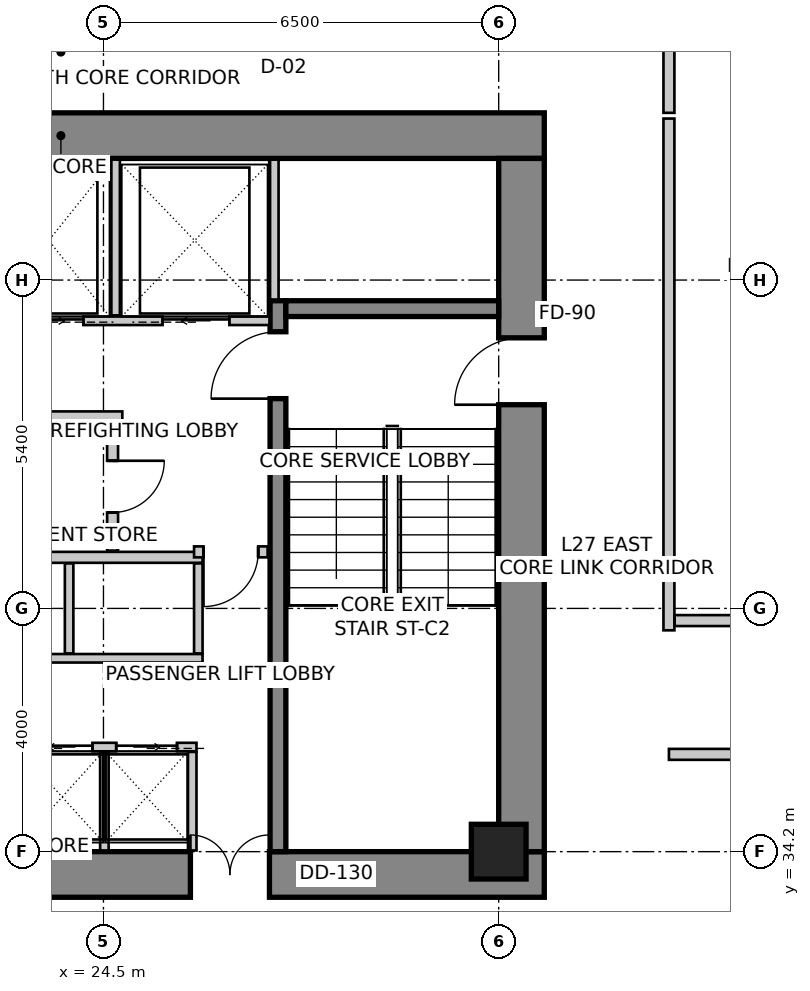
"""IFC4 building model, lengths in metres.
Left out: names, types, materials, properties, quantities, classifications, styles, units other than length and angle.
Written with IfcOpenShell. Run it as: python <this file> out.ifc"""

import sys

from ifc_helpers import new_model, si_unit, direction, frame, frame_2d, origin, origin_2d, place, context, subcontext, project, spatial, rectangle, extrude, source, transform, mapped, element, fill, save


model = new_model("IFC4")
c1 = context("Model", 3, precision=1e-05, world=origin(), true_north=direction((0.0, 1.0)))
c2 = subcontext(c1, "Body", "Model", "MODEL_VIEW")
j1 = project(units=[si_unit("LENGTHUNIT", "METRE"), si_unit("PLANEANGLEUNIT", "RADIAN")], contexts=[c1])
p1 = place(None, origin())
s1 = spatial("IfcSite", under=j1, at=p1, CompositionType="ELEMENT")
p2 = place(p1, origin())
s2 = spatial("IfcBuilding", under=s1, at=p2, CompositionType="ELEMENT")
p3 = place(p2, frame((0.0, 0.0, 114.2)))
s3 = spatial("IfcBuildingStorey", under=s2, at=p3, CompositionType="ELEMENT", Elevation=114.2)
p4 = place(p3, frame((15.85, 45.975, 0.0), z_axis=(0.0, 0.0, 1.0), x_axis=(1.0, 0.0, 0.0)))
e1 = element("IfcWall", 1, at=p4, inside=s3, PredefinedType="SHEAR", context=c2, shape_type="SweptSolid", body=[
    extrude(rectangle(XDim=15.9, YDim=0.75, at=frame_2d((7.95, 0.0))), origin(), (0.0, 0.0, 1.0), 3.6),
])
p5 = place(p3, frame((15.85, 33.825, 0.0), z_axis=(0.0, 0.0, 1.0), x_axis=(1.0, 0.0, 0.0)))
e2 = element("IfcWall", 2, at=p5, inside=s3, PredefinedType="SHEAR", context=c2, shape_type="SweptSolid", body=[
    extrude(rectangle(XDim=15.9, YDim=0.75, at=frame_2d((7.95, 0.0))), origin(), (0.0, 0.0, 1.0), 3.6),
])
m1 = source(origin(), c2, "Body", "SweptSolid", [
    extrude(rectangle(XDim=1.3, YDim=2.15, at=frame_2d((0.65, 1.075))), frame((0.0, 0.385, 0.0), z_axis=(0.0, -1.0, 0.0), x_axis=(1.0, 0.0, 0.0)), (0.0, 0.0, 1.0), 0.77),
])
p6 = place(p5, frame((10.08, 0.0, 0.0)))
e3 = element("IfcOpeningElement", 3, at=p6, cuts=e2, PredefinedType="OPENING", context=c2, shape_type="MappedRepresentation", body=[
    mapped(m1, transform((0.0, 0.0, 0.0), scale=1.0)),
])
p7 = place(p3, frame((31.375, 34.2, 0.0), z_axis=(0.0, 0.0, 1.0), x_axis=(0.0, 1.0, 0.0)))
e4 = element("IfcWall", 4, at=p7, inside=s3, PredefinedType="SHEAR", context=c2, shape_type="SweptSolid", body=[
    extrude(rectangle(XDim=11.4, YDim=0.75, at=frame_2d((5.7, 0.0))), origin(), (0.0, 0.0, 1.0), 3.6),
])
m2 = source(origin(), c2, "Body", "SweptSolid", [
    extrude(rectangle(XDim=1.1, YDim=2.15, at=frame_2d((0.55, 1.075))), frame((0.0, 0.385, 0.0), z_axis=(0.0, -1.0, 0.0), x_axis=(1.0, 0.0, 0.0)), (0.0, 0.0, 1.0), 0.77),
])
p8 = place(p7, frame((7.35, 0.0, 0.0)))
e5 = element("IfcOpeningElement", 5, at=p8, cuts=e4, PredefinedType="OPENING", context=c2, shape_type="MappedRepresentation", body=[
    mapped(m2, transform((0.0, 0.0, 0.0), scale=1.0)),
])
p9 = place(p3, frame((27.37, 34.2, 0.0), z_axis=(0.0, 0.0, 1.0), x_axis=(0.0, 1.0, 0.0)))
e6 = element("IfcWall", 6, at=p9, inside=s3, PredefinedType="SHEAR", context=c2, shape_type="SweptSolid", body=[
    extrude(rectangle(XDim=9.06, YDim=0.26, at=frame_2d((4.53, 0.0))), origin(), (0.0, 0.0, 1.0), 3.6),
])
m3 = source(origin(), c2, "Body", "SweptSolid", [
    extrude(rectangle(XDim=1.1, YDim=2.15, at=frame_2d((0.55, 1.075))), frame((0.0, 0.14, 0.0), z_axis=(0.0, -1.0, 0.0), x_axis=(1.0, 0.0, 0.0)), (0.0, 0.0, 1.0), 0.28),
])
p10 = place(p9, frame((7.45, 0.0, 0.0)))
e7 = element("IfcOpeningElement", 7, at=p10, cuts=e6, PredefinedType="OPENING", context=c2, shape_type="MappedRepresentation", body=[
    mapped(m3, transform((0.0, 0.0, 0.0), scale=1.0)),
])
p11 = place(p3, frame((27.5, 43.13, 0.0), z_axis=(0.0, 0.0, 1.0), x_axis=(1.0, 0.0, 0.0)))
e8 = element("IfcWall", 8, at=p11, inside=s3, PredefinedType="SHEAR", context=c2, shape_type="SweptSolid", body=[
    extrude(rectangle(XDim=3.5, YDim=0.26, at=frame_2d((1.75, 0.0))), origin(), (0.0, 0.0, 1.0), 3.6),
])
m4 = source(origin(), c2, "Body", "SweptSolid", [
    extrude(rectangle(XDim=0.9, YDim=0.9, at=origin_2d()), origin(), (0.0, 0.0, 1.0), 3.6),
])
p12 = place(p3, frame((31.0, 34.2, 0.0), z_axis=(0.0, 0.0, 1.0), x_axis=(1.0, 0.0, 0.0)))
e9 = element("IfcColumn", 9, at=p12, inside=s3, PredefinedType="COLUMN", context=c2, shape_type="MappedRepresentation", body=[
    mapped(m4, transform((0.0, 0.0, 0.0), scale=1.0)),
])
p13 = place(p3, frame((53.561, 47.48, 0.0), z_axis=(0.0, 0.0, 1.0), x_axis=(-0.985845173895, 0.167658262868, 0.0)))
e10 = element("IfcWall", 10, at=p13, inside=s3, PredefinedType="SOLIDWALL", context=c2, shape_type="SweptSolid", body=[
    extrude(rectangle(XDim=32.132, YDim=0.3, at=frame_2d((16.066, 0.0))), origin(), (0.0, 0.0, 1.0), 3.35),
])
m5 = source(origin(), c2, "Body", "SweptSolid", [
    extrude(rectangle(XDim=2.1, YDim=2.0, at=frame_2d((1.05, 1.0))), frame((0.0, 0.16, 0.0), z_axis=(0.0, -1.0, 0.0), x_axis=(1.0, 0.0, 0.0)), (0.0, 0.0, 1.0), 0.32),
])
p14 = place(p13, frame((1.032, 0.0, 0.85)))
e11 = element("IfcOpeningElement", 11, at=p14, cuts=e10, PredefinedType="OPENING", context=c2, shape_type="MappedRepresentation", body=[
    mapped(m5, transform((0.0, 0.0, 0.0), scale=1.0)),
])
p15 = place(p13, frame((4.504, 0.0, 0.85)))
e12 = element("IfcOpeningElement", 12, at=p15, cuts=e10, PredefinedType="OPENING", context=c2, shape_type="MappedRepresentation", body=[
    mapped(m5, transform((0.0, 0.0, 0.0), scale=1.0)),
])
m6 = source(origin(), c2, "Body", "SweptSolid", [
    extrude(rectangle(XDim=1.5, YDim=1.8, at=frame_2d((0.75, 0.9))), frame((0.0, 0.16, 0.0), z_axis=(0.0, -1.0, 0.0), x_axis=(1.0, 0.0, 0.0)), (0.0, 0.0, 1.0), 0.32),
])
p16 = place(p13, frame((7.464, 0.0, 0.85)))
e13 = element("IfcOpeningElement", 13, at=p16, cuts=e10, PredefinedType="OPENING", context=c2, shape_type="MappedRepresentation", body=[
    mapped(m6, transform((0.0, 0.0, 0.0), scale=1.0)),
])
p17 = place(p13, frame((9.824, 0.0, 0.85)))
e14 = element("IfcOpeningElement", 14, at=p17, cuts=e10, PredefinedType="OPENING", context=c2, shape_type="MappedRepresentation", body=[
    mapped(m5, transform((0.0, 0.0, 0.0), scale=1.0)),
])
p18 = place(p13, frame((12.784, 0.0, 0.85)))
e15 = element("IfcOpeningElement", 15, at=p18, cuts=e10, PredefinedType="OPENING", context=c2, shape_type="MappedRepresentation", body=[
    mapped(m6, transform((0.0, 0.0, 0.0), scale=1.0)),
])
p19 = place(p13, frame((15.144, 0.0, 0.85)))
e16 = element("IfcOpeningElement", 16, at=p19, cuts=e10, PredefinedType="OPENING", context=c2, shape_type="MappedRepresentation", body=[
    mapped(m5, transform((0.0, 0.0, 0.0), scale=1.0)),
])
p20 = place(p13, frame((18.086, 0.0, 0.85)))
e17 = element("IfcOpeningElement", 17, at=p20, cuts=e10, PredefinedType="OPENING", context=c2, shape_type="MappedRepresentation", body=[
    mapped(m6, transform((0.0, 0.0, 0.0), scale=1.0)),
])
p21 = place(p13, frame((20.459, 0.0, 0.85)))
e18 = element("IfcOpeningElement", 18, at=p21, cuts=e10, PredefinedType="OPENING", context=c2, shape_type="MappedRepresentation", body=[
    mapped(m5, transform((0.0, 0.0, 0.0), scale=1.0)),
])
p22 = place(p13, frame((25.55, 0.0, 0.85)))
e19 = element("IfcOpeningElement", 19, at=p22, cuts=e10, PredefinedType="OPENING", context=c2, shape_type="MappedRepresentation", body=[
    mapped(m5, transform((0.0, 0.0, 0.0), scale=1.0)),
])
m7 = source(origin(), c2, "Body", "SweptSolid", [
    extrude(rectangle(XDim=0.9, YDim=1.6, at=frame_2d((0.45, 0.8))), frame((0.0, 0.16, 0.0), z_axis=(0.0, -1.0, 0.0), x_axis=(1.0, 0.0, 0.0)), (0.0, 0.0, 1.0), 0.32),
])
p23 = place(p13, frame((30.65, 0.0, 0.85)))
e20 = element("IfcOpeningElement", 20, at=p23, cuts=e10, PredefinedType="OPENING", context=c2, shape_type="MappedRepresentation", body=[
    mapped(m7, transform((0.0, 0.0, 0.0), scale=1.0)),
])
p24 = place(p3, frame((20.37, 42.93, 0.0), z_axis=(0.0, 0.0, 1.0), x_axis=(1.0, 0.0, 0.0)))
e21 = element("IfcWall", 21, at=p24, inside=s3, PredefinedType="SOLIDWALL", context=c2, shape_type="SweptSolid", body=[
    extrude(rectangle(XDim=6.86, YDim=0.14, at=frame_2d((3.43, 0.0))), origin(), (0.0, 0.0, 1.0), 3.35),
])
m8 = source(origin(), c2, "Body", "SweptSolid", [
    extrude(rectangle(XDim=1.1, YDim=2.15, at=frame_2d((0.55, 1.075))), frame((0.0, 0.08, 0.0), z_axis=(0.0, -1.0, 0.0), x_axis=(1.0, 0.0, 0.0)), (0.0, 0.0, 1.0), 0.16),
])
p25 = place(p24, frame((0.5, 0.0, 0.0)))
e22 = element("IfcOpeningElement", 22, at=p25, cuts=e21, PredefinedType="OPENING", context=c2, shape_type="MappedRepresentation", body=[
    mapped(m8, transform((0.0, 0.0, 0.0), scale=1.0)),
])
p26 = place(p24, frame((2.7, 0.0, 0.0)))
e23 = element("IfcOpeningElement", 23, at=p26, cuts=e21, PredefinedType="OPENING", context=c2, shape_type="MappedRepresentation", body=[
    mapped(m8, transform((0.0, 0.0, 0.0), scale=1.0)),
])
p27 = place(p24, frame((5.1, 0.0, 0.0)))
e24 = element("IfcOpeningElement", 24, at=p27, cuts=e21, PredefinedType="OPENING", context=c2, shape_type="MappedRepresentation", body=[
    mapped(m8, transform((0.0, 0.0, 0.0), scale=1.0)),
])
p28 = place(p3, frame((27.31, 43.28, 0.0), z_axis=(0.0, 0.0, 1.0), x_axis=(0.0, 1.0, 0.0)))
e25 = element("IfcWall", 25, at=p28, inside=s3, PredefinedType="SOLIDWALL", context=c2, shape_type="SweptSolid", body=[
    extrude(rectangle(XDim=2.3, YDim=0.14, at=frame_2d((1.15, 0.0))), origin(), (0.0, 0.0, 1.0), 3.35),
])
p29 = place(p3, frame((24.7, 43.02, 0.0), z_axis=(0.0, 0.0, 1.0), x_axis=(0.0, 1.0, 0.0)))
e26 = element("IfcWall", 26, at=p29, inside=s3, PredefinedType="SOLIDWALL", context=c2, shape_type="SweptSolid", body=[
    extrude(rectangle(XDim=2.56, YDim=0.14, at=frame_2d((1.28, 0.0))), origin(), (0.0, 0.0, 1.0), 3.35),
])
p30 = place(p3, frame((23.0, 35.92, 0.0), z_axis=(0.0, 0.0, 1.0), x_axis=(1.0, 0.0, 0.0)))
e27 = element("IfcWall", 27, at=p30, inside=s3, PredefinedType="SOLIDWALL", context=c2, shape_type="SweptSolid", body=[
    extrude(rectangle(XDim=3.03, YDim=0.14, at=frame_2d((1.515, 0.0))), origin(), (0.0, 0.0, 1.0), 3.35),
])
m9 = source(origin(), c2, "Body", "SweptSolid", [
    extrude(rectangle(XDim=1.0, YDim=2.15, at=frame_2d((0.5, 1.075))), frame((0.0, 0.08, 0.0), z_axis=(0.0, -1.0, 0.0), x_axis=(1.0, 0.0, 0.0)), (0.0, 0.0, 1.0), 0.16),
])
p31 = place(p30, frame((0.32, 0.0, 0.0)))
e28 = element("IfcOpeningElement", 28, at=p31, cuts=e27, PredefinedType="OPENING", context=c2, shape_type="MappedRepresentation", body=[
    mapped(m9, transform((0.0, 0.0, 0.0), scale=1.0)),
])
p32 = place(p30, frame((1.71, 0.0, 0.0)))
e29 = element("IfcOpeningElement", 29, at=p32, cuts=e27, PredefinedType="OPENING", context=c2, shape_type="MappedRepresentation", body=[
    mapped(m9, transform((0.0, 0.0, 0.0), scale=1.0)),
])
for number, where, z_axis, x_axis in (
    (30, (25.96, 34.22, 0.0), (0.0, 0.0, 1.0), (0.0, 1.0, 0.0)),
    (31, (24.515, 34.22, 0.0), (0.0, 0.0, 1.0), (0.0, 1.0, 0.0)),
):
    element("IfcWall", number, at=place(p3, frame(where, z_axis=z_axis, x_axis=x_axis)), inside=s3, PredefinedType="SOLIDWALL", context=c2, shape_type="SweptSolid", body=[
        extrude(rectangle(XDim=1.62, YDim=0.14, at=frame_2d((0.81, 0.0))), origin(), (0.0, 0.0, 1.0), 2.642),
    ])
p33 = place(p3, frame((20.38, 37.38, 0.0), z_axis=(0.0, 0.0, 1.0), x_axis=(1.0, 0.0, 0.0)))
e32 = element("IfcWall", 32, at=p33, inside=s3, PredefinedType="SOLIDWALL", context=c2, shape_type="SweptSolid", body=[
    extrude(rectangle(XDim=5.75, YDim=0.14, at=frame_2d((2.875, 0.0))), origin(), (0.0, 0.0, 1.0), 3.35),
])
p34 = place(p3, frame((20.38, 39.04, 0.0), z_axis=(0.0, 0.0, 1.0), x_axis=(1.0, 0.0, 0.0)))
e33 = element("IfcWall", 33, at=p34, inside=s3, PredefinedType="SOLIDWALL", context=c2, shape_type="SweptSolid", body=[
    extrude(rectangle(XDim=5.75, YDim=0.18, at=frame_2d((2.875, 0.0))), origin(), (0.0, 0.0, 1.0), 3.35),
])
for number, where, z_axis, x_axis in (
    (34, (26.06, 37.46, 0.0), (0.0, 0.0, 1.0), (0.0, 1.0, 0.0)),
    (35, (23.935, 37.46, 0.0), (0.0, 0.0, 1.0), (0.0, 1.0, 0.0)),
):
    element("IfcWall", number, at=place(p3, frame(where, z_axis=z_axis, x_axis=x_axis)), inside=s3, PredefinedType="SOLIDWALL", context=c2, shape_type="SweptSolid", body=[
        extrude(rectangle(XDim=1.48, YDim=0.14, at=frame_2d((0.74, 0.0))), origin(), (0.0, 0.0, 1.0), 3.35),
    ])
p35 = place(p3, frame((24.81, 41.35, 0.0), z_axis=(0.0, 0.0, 1.0), x_axis=(-1.0, 0.0, 0.0)))
e36 = element("IfcWall", 36, at=p35, inside=s3, PredefinedType="PARTITIONING", context=c2, shape_type="SweptSolid", body=[
    extrude(rectangle(XDim=2.148, YDim=0.18, at=frame_2d((1.074, 0.0))), origin(), (0.0, 0.0, 1.0), 3.35),
])
p36 = place(p3, frame((24.65, 41.256, 0.0), z_axis=(0.0, 0.0, 1.0), x_axis=(0.0, -1.0, 0.0)))
e37 = element("IfcWall", 37, at=p36, inside=s3, PredefinedType="PARTITIONING", context=c2, shape_type="SweptSolid", body=[
    extrude(rectangle(XDim=2.106, YDim=0.18, at=frame_2d((1.053, 0.0))), origin(), (0.0, 0.0, 1.0), 3.35),
])
m10 = source(origin(), c2, "Body", "SweptSolid", [
    extrude(rectangle(XDim=0.85, YDim=2.15, at=frame_2d((0.425, 1.075))), frame((0.0, 0.1, 0.0), z_axis=(0.0, -1.0, 0.0), x_axis=(1.0, 0.0, 0.0)), (0.0, 0.0, 1.0), 0.2),
])
p37 = place(p36, frame((0.628, 0.0, 0.0)))
e38 = element("IfcOpeningElement", 38, at=p37, cuts=e37, PredefinedType="OPENING", context=c2, shape_type="MappedRepresentation", body=[
    mapped(m10, transform((0.0, 0.0, 0.0), scale=1.0)),
])
p38 = place(p3, frame((27.2, 39.13, 0.0), z_axis=(0.0, 0.0, 1.0), x_axis=(-1.0, 0.0, 0.0)))
e39 = element("IfcWall", 39, at=p38, inside=s3, PredefinedType="PARTITIONING", context=c2, shape_type="SweptSolid", body=[
    extrude(rectangle(XDim=1.21, YDim=0.18, at=frame_2d((0.605, 0.0))), origin(), (0.0, 0.0, 1.0), 3.35),
])
m11 = source(origin(), c2, "Body", "SweptSolid", [
    extrude(rectangle(XDim=0.9, YDim=2.15, at=frame_2d((0.45, 1.075))), frame((0.0, 0.1, 0.0), z_axis=(0.0, -1.0, 0.0), x_axis=(1.0, 0.0, 0.0)), (0.0, 0.0, 1.0), 0.2),
])
p39 = place(p38, frame((0.155, 0.0, 0.0)))
e40 = element("IfcOpeningElement", 40, at=p39, cuts=e39, PredefinedType="OPENING", context=c2, shape_type="MappedRepresentation", body=[
    mapped(m11, transform((0.0, 0.0, 0.0), scale=1.0)),
])
p40 = place(p3, frame((33.8, 48.5, 0.0), z_axis=(0.0, 0.0, 1.0), x_axis=(0.0, -1.0, 0.0)))
e41 = element("IfcWall", 41, at=p40, inside=s3, PredefinedType="PARTITIONING", context=c2, shape_type="SweptSolid", body=[
    extrude(rectangle(XDim=2.15, YDim=0.18, at=frame_2d((1.075, 0.0))), origin(), (0.0, 0.0, 1.0), 2.492),
])
p41 = place(p3, frame((33.8, 46.256, 0.0), z_axis=(0.0, 0.0, 1.0), x_axis=(0.0, -1.0, 0.0)))
e42 = element("IfcWall", 42, at=p41, inside=s3, PredefinedType="PARTITIONING", context=c2, shape_type="SweptSolid", body=[
    extrude(rectangle(XDim=8.416, YDim=0.18, at=frame_2d((4.208, 0.0))), origin(), (0.0, 0.0, 1.0), 2.788),
])
p42 = place(p3, frame((33.894, 38.0, 0.0), z_axis=(0.0, 0.0, 1.0), x_axis=(1.0, 0.0, 0.0)))
e43 = element("IfcWall", 43, at=p42, inside=s3, PredefinedType="PARTITIONING", context=c2, shape_type="SweptSolid", body=[
    extrude(rectangle(XDim=5.311, YDim=0.18, at=frame_2d((2.656, 0.0))), origin(), (0.0, 0.0, 1.0), 2.803),
])
p43 = place(p42, frame((2.206, 0.0, 0.0)))
e44 = element("IfcOpeningElement", 44, at=p43, cuts=e43, PredefinedType="OPENING", context=c2, shape_type="MappedRepresentation", body=[
    mapped(m11, transform((0.0, 0.0, 0.0), scale=1.0)),
])
p44 = place(p3, frame((49.441, 35.8, 0.0), z_axis=(0.0, 0.0, 1.0), x_axis=(-1.0, 0.0, 0.0)))
e45 = element("IfcWall", 45, at=p44, inside=s3, PredefinedType="PARTITIONING", context=c2, shape_type="SweptSolid", body=[
    extrude(rectangle(XDim=15.641, YDim=0.18, at=frame_2d((7.82, 0.0))), origin(), (0.0, 0.0, 1.0), 2.788),
])
p45 = place(p44, frame((7.371, 0.0, 0.0)))
e46 = element("IfcOpeningElement", 46, at=p45, cuts=e45, PredefinedType="OPENING", context=c2, shape_type="MappedRepresentation", body=[
    mapped(m11, transform((0.0, 0.0, 0.0), scale=1.0)),
])
m12 = source(origin(), c2, "Body", "SweptSolid", [
    extrude(rectangle(XDim=1.1, YDim=2.15, at=frame_2d((0.55, 1.075))), frame((0.0, 0.025, 0.0), z_axis=(0.0, -1.0, 0.0), x_axis=(1.0, 0.0, 0.0)), (0.0, 0.0, 1.0), 0.05),
])
p46 = place(p26, origin())
e47 = element("IfcDoor", 47, at=p46, inside=s3, OperationType="SLIDING_TO_RIGHT", PredefinedType="DOOR", context=c2, shape_type="MappedRepresentation", body=[
    mapped(m12, transform((0.0, 0.0, 0.0), scale=1.0)),
])
fill(e23, e47)
m13 = source(origin(), c2, "Body", "SweptSolid", [
    extrude(rectangle(XDim=1.1, YDim=2.15, at=frame_2d((0.55, 1.075))), frame((0.0, 0.025, 0.0), z_axis=(0.0, -1.0, 0.0), x_axis=(1.0, 0.0, 0.0)), (0.0, 0.0, 1.0), 0.05),
])
p47 = place(p27, origin())
e48 = element("IfcDoor", 48, at=p47, inside=s3, OperationType="SLIDING_TO_LEFT", PredefinedType="DOOR", context=c2, shape_type="MappedRepresentation", body=[
    mapped(m13, transform((0.0, 0.0, 0.0), scale=1.0)),
])
fill(e24, e48)
m14 = source(origin(), c2, "Body", "SweptSolid", [
    extrude(rectangle(XDim=1.0, YDim=2.15, at=frame_2d((0.5, 1.075))), frame((0.0, 0.025, 0.0), z_axis=(0.0, -1.0, 0.0), x_axis=(1.0, 0.0, 0.0)), (0.0, 0.0, 1.0), 0.05),
])
p48 = place(p31, origin())
e49 = element("IfcDoor", 49, at=p48, inside=s3, OperationType="SLIDING_TO_LEFT", PredefinedType="DOOR", context=c2, shape_type="MappedRepresentation", body=[
    mapped(m14, transform((0.0, 0.0, 0.0), scale=1.0)),
])
fill(e28, e49)
p49 = place(p32, origin())
e50 = element("IfcDoor", 50, at=p49, inside=s3, OperationType="SLIDING_TO_RIGHT", PredefinedType="DOOR", context=c2, shape_type="MappedRepresentation", body=[
    mapped(m14, transform((0.0, 0.0, 0.0), scale=1.0)),
])
fill(e29, e50)
m15 = source(origin(), c2, "Body", "SweptSolid", [
    extrude(rectangle(XDim=1.1, YDim=2.15, at=frame_2d((0.55, 1.075))), frame((0.0, 0.025, 0.0), z_axis=(0.0, -1.0, 0.0), x_axis=(1.0, 0.0, 0.0)), (0.0, 0.0, 1.0), 0.05),
])
p50 = place(p10, origin())
e51 = element("IfcDoor", 51, at=p50, inside=s3, OperationType="SINGLE_SWING_LEFT", PredefinedType="DOOR", context=c2, shape_type="MappedRepresentation", body=[
    mapped(m15, transform((0.0, 0.0, 0.0), scale=1.0)),
])
fill(e7, e51)
p51 = place(p8, origin())
e52 = element("IfcDoor", 52, at=p51, inside=s3, OperationType="SINGLE_SWING_LEFT", PredefinedType="DOOR", context=c2, shape_type="MappedRepresentation", body=[
    mapped(m15, transform((0.0, 0.0, 0.0), scale=1.0)),
])
fill(e5, e52)
m16 = source(origin(), c2, "Body", "SweptSolid", [
    extrude(rectangle(XDim=1.3, YDim=2.15, at=frame_2d((0.65, 1.075))), frame((0.0, 0.025, 0.0), z_axis=(0.0, -1.0, 0.0), x_axis=(1.0, 0.0, 0.0)), (0.0, 0.0, 1.0), 0.05),
])
p52 = place(p6, origin())
e53 = element("IfcDoor", 53, at=p52, inside=s3, OperationType="DOUBLE_DOOR_SINGLE_SWING", PredefinedType="DOOR", context=c2, shape_type="MappedRepresentation", body=[
    mapped(m16, transform((0.0, 0.0, 0.0), scale=1.0)),
])
fill(e3, e53)
m17 = source(origin(), c2, "Body", "SweptSolid", [
    extrude(rectangle(XDim=0.85, YDim=2.15, at=frame_2d((0.425, 1.075))), frame((0.0, 0.025, 0.0), z_axis=(0.0, -1.0, 0.0), x_axis=(1.0, 0.0, 0.0)), (0.0, 0.0, 1.0), 0.05),
])
p53 = place(p37, origin())
e54 = element("IfcDoor", 54, at=p53, inside=s3, OperationType="SINGLE_SWING_LEFT", PredefinedType="DOOR", context=c2, shape_type="MappedRepresentation", body=[
    mapped(m17, transform((0.0, 0.0, 0.0), scale=1.0)),
])
fill(e38, e54)
m18 = source(origin(), c2, "Body", "SweptSolid", [
    extrude(rectangle(XDim=0.9, YDim=2.15, at=frame_2d((0.45, 1.075))), frame((0.0, 0.025, 0.0), z_axis=(0.0, -1.0, 0.0), x_axis=(1.0, 0.0, 0.0)), (0.0, 0.0, 1.0), 0.05),
])
p54 = place(p39, origin())
e55 = element("IfcDoor", 55, at=p54, inside=s3, OperationType="SINGLE_SWING_RIGHT", PredefinedType="DOOR", context=c2, shape_type="MappedRepresentation", body=[
    mapped(m18, transform((0.0, 0.0, 0.0), scale=1.0)),
])
fill(e40, e55)
save(model, sys.argv[1])
